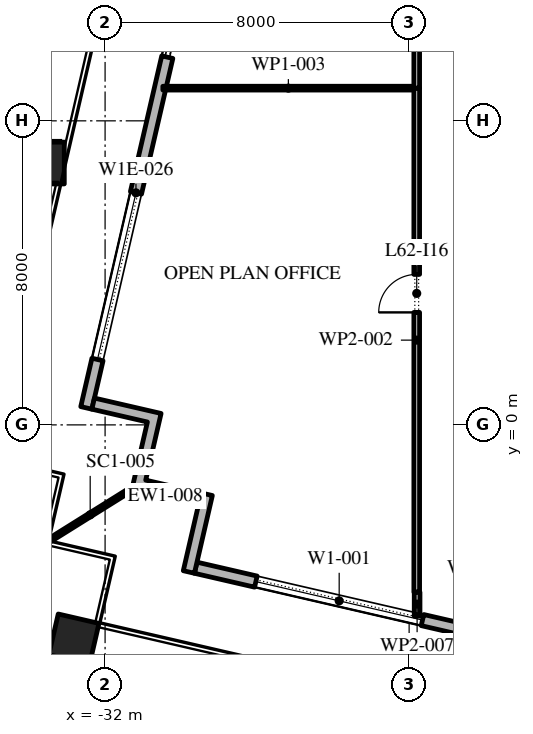
"""IFC4 building model, lengths in metres.
Left out: names, types, materials, properties, quantities, classifications, styles, units other than length and angle.
Written with IfcOpenShell. Run it as: python <this file> out.ifc"""

import sys

from ifc_helpers import new_model, si_unit, direction, frame, frame_2d, origin, origin_2d, place, context, subcontext, project, spatial, polyline, rectangle, outline, extrude, element, fill, save


model = new_model("IFC4")
c1 = context("Model", 3, precision=1e-05, world=origin(), true_north=direction((0.0, 1.0)))
c2 = subcontext(c1, "Body", "Model", "MODEL_VIEW")
j1 = project(units=[si_unit("LENGTHUNIT", "METRE"), si_unit("PLANEANGLEUNIT", "RADIAN")], contexts=[c1])
p1 = place(None, origin())
s1 = spatial("IfcSite", under=j1, at=p1, CompositionType="ELEMENT")
p2 = place(p1, origin())
s2 = spatial("IfcBuilding", under=s1, at=p2, CompositionType="ELEMENT")
p3 = place(p2, frame((0.0, 0.0, 285.0)))
s3 = spatial("IfcBuildingStorey", under=s2, at=p3, CompositionType="ELEMENT", Elevation=285.0)
p4 = place(p3, frame((-32.821, -5.635, 0.0), z_axis=(0.0, 0.0, 1.0), x_axis=(0.974370064785, -0.224951054344, 0.0)))
e1 = element("IfcColumn", 1, at=p4, inside=s3, PredefinedType="COLUMN", context=c2, shape_type="SweptSolid", body=[
    extrude(rectangle(XDim=1.1, YDim=1.1, at=origin_2d()), origin(), (0.0, 0.0, 1.0), 4.2),
])
p5 = place(p3, frame((-33.624, 6.889, 0.0), z_axis=(0.002906224189, 0.012671137464, 0.999915494498), x_axis=(-0.974691740237, 0.22355315143, 0.0)))
e2 = element("IfcColumn", 2, at=p5, inside=s3, PredefinedType="COLUMN", context=c2, shape_type="SweptSolid", body=[
    extrude(rectangle(XDim=1.1, YDim=1.1, at=origin_2d()), origin(), (0.0, 0.0, 1.0), 4.2),
])
p6 = place(p3, frame((-29.616, -3.758, 0.0), z_axis=(0.0, 0.0, 1.0), x_axis=(0.974370532314, -0.224949029246, 0.0)))
e3 = element("IfcWall", 3, at=p6, inside=s3, PredefinedType="STANDARD", context=c2, shape_type="SweptSolid", body=[
    extrude(rectangle(XDim=48.0, YDim=0.3, at=frame_2d((24.0, 0.0))), origin(), (0.0, 0.0, 1.0), 4.0),
])
p7 = place(p6, frame((1.625, 0.0, 0.45)))
e4 = element("IfcOpeningElement", 4, at=p7, cuts=e3, PredefinedType="OPENING", context=c2, shape_type="SweptSolid", body=[
    extrude(rectangle(XDim=4.5, YDim=3.05, at=frame_2d((2.25, 1.525))), frame((0.0, 0.16, 0.0), z_axis=(0.0, -1.0, 0.0), x_axis=(1.0, 0.0, 0.0)), (0.0, 0.0, 1.0), 0.32),
])
p8 = place(p6, frame((10.575, 0.0, 0.0)))
e5 = element("IfcOpeningElement", 5, at=p8, cuts=e3, PredefinedType="OPENING", context=c2, shape_type="SweptSolid", body=[
    extrude(rectangle(XDim=2.4, YDim=3.5, at=frame_2d((1.2, 1.75))), frame((0.0, 0.16, 0.0), z_axis=(0.0, -1.0, 0.0), x_axis=(1.0, 0.0, 0.0)), (0.0, 0.0, 1.0), 0.32),
])
p9 = place(p6, frame((17.575, 0.0, 0.45)))
e6 = element("IfcOpeningElement", 6, at=p9, cuts=e3, PredefinedType="OPENING", context=c2, shape_type="SweptSolid", body=[
    extrude(rectangle(XDim=4.5, YDim=3.0, at=frame_2d((2.25, 1.5))), frame((0.0, 0.16, 0.0), z_axis=(0.0, -1.0, 0.0), x_axis=(1.0, 0.0, 0.0)), (0.0, 0.0, 1.0), 0.32),
])
p10 = place(p6, frame((25.625, 0.0, 0.45)))
e7 = element("IfcOpeningElement", 7, at=p10, cuts=e3, PredefinedType="OPENING", context=c2, shape_type="SweptSolid", body=[
    extrude(rectangle(XDim=4.5, YDim=2.95, at=frame_2d((2.25, 1.475))), frame((0.0, 0.16, 0.0), z_axis=(0.0, -1.0, 0.0), x_axis=(1.0, 0.0, 0.0)), (0.0, 0.0, 1.0), 0.32),
])
p11 = place(p6, frame((33.675, 0.0, 0.45)))
e8 = element("IfcOpeningElement", 8, at=p11, cuts=e3, PredefinedType="OPENING", context=c2, shape_type="SweptSolid", body=[
    extrude(rectangle(XDim=4.5, YDim=2.825, at=frame_2d((2.25, 1.413))), frame((0.0, 0.16, 0.0), z_axis=(0.0, -1.0, 0.0), x_axis=(1.0, 0.0, 0.0)), (0.0, 0.0, 1.0), 0.32),
])
p12 = place(p6, frame((42.775, 0.0, 0.0)))
e9 = element("IfcOpeningElement", 9, at=p12, cuts=e3, PredefinedType="OPENING", context=c2, shape_type="SweptSolid", body=[
    extrude(rectangle(XDim=2.4, YDim=3.5, at=frame_2d((1.2, 1.75))), frame((0.0, 0.16, 0.0), z_axis=(0.0, -1.0, 0.0), x_axis=(1.0, 0.0, 0.0)), (0.0, 0.0, 1.0), 0.32),
])
p13 = place(p3, frame((-21.359, 48.678, 0.0), z_axis=(0.0, 0.0, 1.0), x_axis=(-0.224949198343, -0.974370493275, 0.0)))
e10 = element("IfcWall", 10, at=p13, inside=s3, PredefinedType="STANDARD", context=c2, shape_type="SweptSolid", body=[
    extrude(rectangle(XDim=49.5, YDim=0.3, at=frame_2d((24.75, 0.0))), origin(), (0.0, 0.0, 1.0), 4.0),
])
p14 = place(p13, frame((1.157, 0.0, 0.45)))
e11 = element("IfcOpeningElement", 11, at=p14, cuts=e10, PredefinedType="OPENING", context=c2, shape_type="SweptSolid", body=[
    extrude(rectangle(XDim=4.5, YDim=3.05, at=frame_2d((2.25, 1.525))), frame((0.0, 0.16, 0.0), z_axis=(0.0, -1.0, 0.0), x_axis=(1.0, 0.0, 0.0)), (0.0, 0.0, 1.0), 0.32),
])
p15 = place(p13, frame((9.171, 0.0, 0.0)))
e12 = element("IfcOpeningElement", 12, at=p15, cuts=e10, PredefinedType="OPENING", context=c2, shape_type="SweptSolid", body=[
    extrude(rectangle(XDim=2.4, YDim=3.5, at=frame_2d((1.2, 1.75))), frame((0.0, 0.16, 0.0), z_axis=(0.0, -1.0, 0.0), x_axis=(1.0, 0.0, 0.0)), (0.0, 0.0, 1.0), 0.32),
])
p16 = place(p13, frame((15.236, 0.0, 0.45)))
e13 = element("IfcOpeningElement", 13, at=p16, cuts=e10, PredefinedType="OPENING", context=c2, shape_type="SweptSolid", body=[
    extrude(rectangle(XDim=4.5, YDim=3.05, at=frame_2d((2.25, 1.525))), frame((0.0, 0.16, 0.0), z_axis=(0.0, -1.0, 0.0), x_axis=(1.0, 0.0, 0.0)), (0.0, 0.0, 1.0), 0.32),
])
p17 = place(p13, frame((22.35, 0.0, 0.45)))
e14 = element("IfcOpeningElement", 14, at=p17, cuts=e10, PredefinedType="OPENING", context=c2, shape_type="SweptSolid", body=[
    extrude(rectangle(XDim=4.5, YDim=3.05, at=frame_2d((2.25, 1.525))), frame((0.0, 0.16, 0.0), z_axis=(0.0, -1.0, 0.0), x_axis=(1.0, 0.0, 0.0)), (0.0, 0.0, 1.0), 0.32),
])
p18 = place(p13, frame((29.464, 0.0, 0.45)))
e15 = element("IfcOpeningElement", 15, at=p18, cuts=e10, PredefinedType="OPENING", context=c2, shape_type="SweptSolid", body=[
    extrude(rectangle(XDim=4.5, YDim=3.05, at=frame_2d((2.25, 1.525))), frame((0.0, 0.16, 0.0), z_axis=(0.0, -1.0, 0.0), x_axis=(1.0, 0.0, 0.0)), (0.0, 0.0, 1.0), 0.32),
])
p19 = place(p13, frame((37.628, 0.0, 0.0)))
e16 = element("IfcOpeningElement", 16, at=p19, cuts=e10, PredefinedType="OPENING", context=c2, shape_type="SweptSolid", body=[
    extrude(rectangle(XDim=2.4, YDim=3.325, at=frame_2d((1.2, 1.663))), frame((0.0, 0.16, 0.0), z_axis=(0.0, -1.0, 0.0), x_axis=(1.0, 0.0, 0.0)), (0.0, 0.0, 1.0), 0.32),
])
p20 = place(p13, frame((43.693, 0.0, 0.45)))
e17 = element("IfcOpeningElement", 17, at=p20, cuts=e10, PredefinedType="OPENING", context=c2, shape_type="SweptSolid", body=[
    extrude(rectangle(XDim=4.5, YDim=2.825, at=frame_2d((2.25, 1.413))), frame((0.0, 0.16, 0.0), z_axis=(0.0, -1.0, 0.0), x_axis=(1.0, 0.0, 0.0)), (0.0, 0.0, 1.0), 0.32),
])
p21 = place(p3, origin())
e18 = element("IfcWall", 18, at=p21, inside=s3, PredefinedType="STANDARD", context=c2, shape_type="SweptSolid", body=[
    extrude(outline(polyline([(-31.291, -1.678), (-30.886, 0.076), (-32.348, 0.413), (-32.28, 0.705), (-30.526, 0.301), (-30.931, -1.453), (-29.177, -1.858), (-29.65, -3.905), (-29.942, -3.837), (-29.537, -2.083), (-31.291, -1.678)])), origin(), (0.0, 0.0, 1.0), 4.0),
])
p22 = place(p3, frame((-31.291, -1.678, -0.05), z_axis=(0.0, 0.0, 1.0), x_axis=(-0.84807753525, -0.529872148923, 0.0)))
e19 = element("IfcWall", 19, at=p22, inside=s3, PredefinedType="STANDARD", context=c2, shape_type="SweptSolid", body=[
    extrude(rectangle(XDim=2.596, YDim=0.1, at=frame_2d((1.298, 0.0))), origin(), (0.0, 0.0, 1.0), 4.05),
])
p23 = place(p3, frame((-23.8, -4.4, 0.0), z_axis=(0.0, 0.0, 1.0), x_axis=(0.0, 1.0, 0.0)))
e20 = element("IfcWall", 20, at=p23, inside=s3, PredefinedType="PARTITIONING", context=c2, shape_type="SweptSolid", body=[
    extrude(rectangle(XDim=13.26, YDim=0.15, at=frame_2d((6.63, 0.0))), origin(), (0.0, 0.0, 1.0), 4.0),
])
p24 = place(p23, frame((7.36, 0.0, 0.0)))
e21 = element("IfcOpeningElement", 21, at=p24, cuts=e20, PredefinedType="OPENING", context=c2, shape_type="SweptSolid", body=[
    extrude(rectangle(XDim=1.0, YDim=2.1, at=frame_2d((0.5, 1.05))), frame((0.0, 0.085, 0.0), z_axis=(0.0, -1.0, 0.0), x_axis=(1.0, 0.0, 0.0)), (0.0, 0.0, 1.0), 0.17),
])
p25 = place(p3, frame((-23.875, 8.86, 0.0), z_axis=(0.0, 0.0, 1.0), x_axis=(-1.0, 0.0, 0.0)))
e22 = element("IfcWall", 22, at=p25, inside=s3, PredefinedType="PARTITIONING", context=c2, shape_type="SweptSolid", body=[
    extrude(rectangle(XDim=6.605, YDim=0.1, at=frame_2d((3.302, 0.0))), origin(), (0.0, 0.0, 1.0), 4.0),
])
p26 = place(p3, frame((-23.8, 8.86, 0.0), z_axis=(0.0, 0.0, 1.0), x_axis=(0.0, 1.0, 0.0)))
e23 = element("IfcWall", 23, at=p26, inside=s3, PredefinedType="PARTITIONING", context=c2, shape_type="SweptSolid", body=[
    extrude(rectangle(XDim=20.875, YDim=0.15, at=frame_2d((10.438, 0.0))), origin(), (0.0, 0.0, 1.0), 4.0),
])
p27 = place(p26, frame((7.9, 0.0, 0.0)))
e24 = element("IfcOpeningElement", 24, at=p27, cuts=e23, PredefinedType="OPENING", context=c2, shape_type="SweptSolid", body=[
    extrude(rectangle(XDim=1.0, YDim=2.1, at=frame_2d((0.5, 1.05))), frame((0.0, 0.085, 0.0), z_axis=(0.0, -1.0, 0.0), x_axis=(1.0, 0.0, 0.0)), (0.0, 0.0, 1.0), 0.17),
])
p28 = place(p3, frame((-23.79, -5.032, 0.0), z_axis=(0.0, 0.0, 1.0), x_axis=(0.0, 1.0, 0.0)))
e25 = element("IfcWall", 25, at=p28, inside=s3, PredefinedType="PARTITIONING", context=c2, shape_type="SweptSolid", body=[
    extrude(rectangle(XDim=0.632, YDim=0.15, at=frame_2d((0.316, 0.0))), origin(), (0.0, 0.0, 1.0), 4.0),
])
p29 = place(p7, origin())
e26 = element("IfcWindow", 26, at=p29, inside=s3, PartitioningType="DOUBLE_PANEL_VERTICAL", PredefinedType="WINDOW", context=c2, shape_type="SweptSolid", body=[
    extrude(rectangle(XDim=4.5, YDim=3.05, at=frame_2d((2.25, 1.525))), frame((0.0, 0.03, 0.0), z_axis=(0.0, -1.0, 0.0), x_axis=(1.0, 0.0, 0.0)), (0.0, 0.0, 1.0), 0.06),
])
fill(e4, e26)
p30 = place(p19, origin())
e27 = element("IfcDoor", 27, at=p30, inside=s3, OperationType="DOUBLE_DOOR_SLIDING", PredefinedType="DOOR", context=c2, shape_type="SweptSolid", body=[
    extrude(rectangle(XDim=2.4, YDim=3.325, at=frame_2d((1.2, 1.663))), frame((0.0, 0.025, 0.0), z_axis=(0.0, -1.0, 0.0), x_axis=(1.0, 0.0, 0.0)), (0.0, 0.0, 1.0), 0.05),
])
fill(e16, e27)
p31 = place(p20, origin())
e28 = element("IfcWindow", 28, at=p31, inside=s3, PartitioningType="DOUBLE_PANEL_VERTICAL", PredefinedType="WINDOW", context=c2, shape_type="SweptSolid", body=[
    extrude(rectangle(XDim=4.5, YDim=2.825, at=frame_2d((2.25, 1.413))), frame((0.0, 0.03, 0.0), z_axis=(0.0, -1.0, 0.0), x_axis=(1.0, 0.0, 0.0)), (0.0, 0.0, 1.0), 0.06),
])
fill(e17, e28)
p32 = place(p24, origin())
e29 = element("IfcDoor", 29, at=p32, inside=s3, OperationType="SINGLE_SWING_RIGHT", PredefinedType="DOOR", context=c2, shape_type="SweptSolid", body=[
    extrude(rectangle(XDim=1.0, YDim=2.1, at=frame_2d((0.5, 1.05))), frame((0.0, 0.025, 0.0), z_axis=(0.0, -1.0, 0.0), x_axis=(1.0, 0.0, 0.0)), (0.0, 0.0, 1.0), 0.05),
])
fill(e21, e29)
save(model, sys.argv[1])
